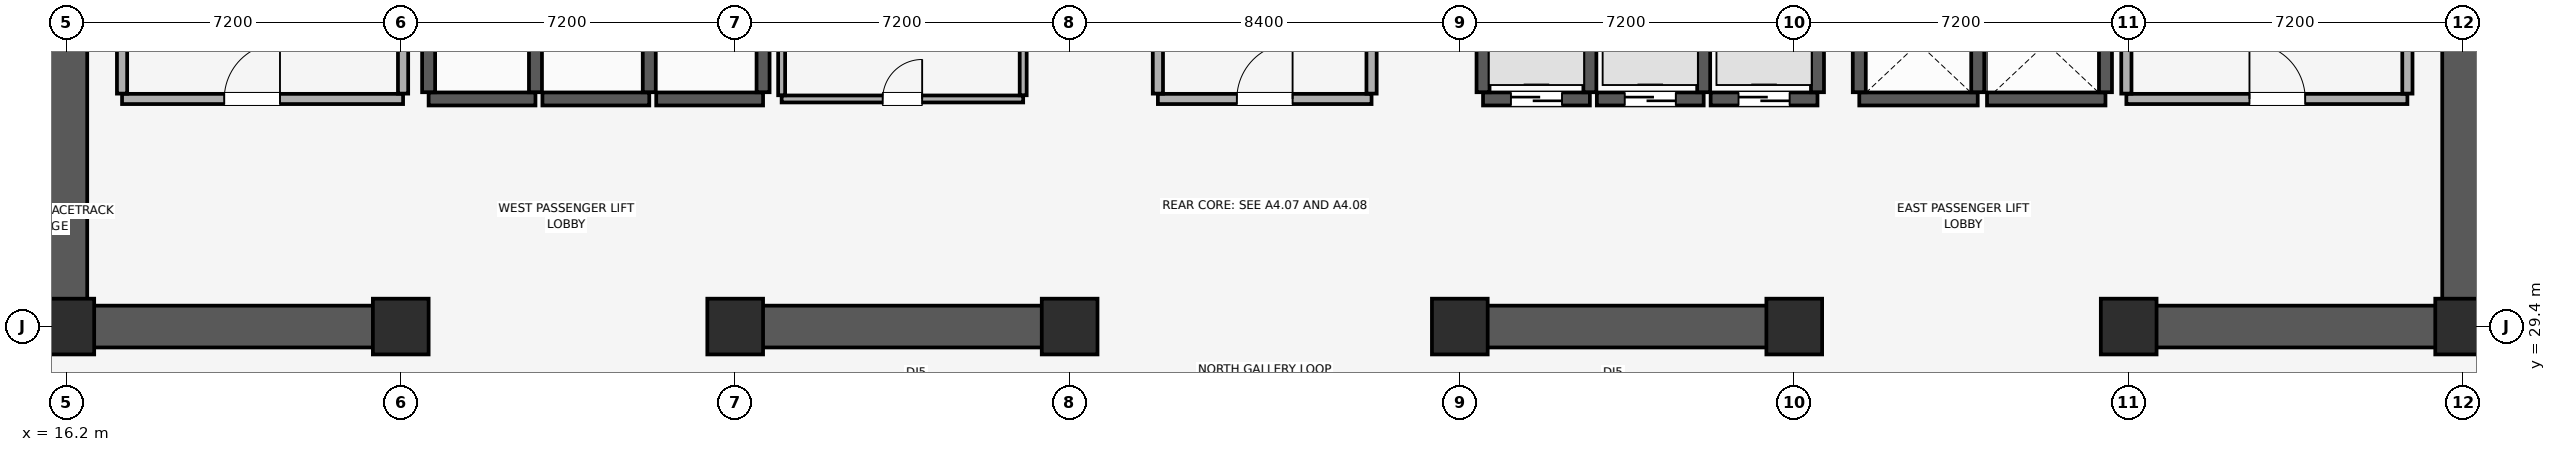
"""IFC4 building model, lengths in metres.
Left out: names, types, materials, properties, quantities, classifications, styles, units other than length and angle.
Written with IfcOpenShell. Run it as: python <this file> out.ifc"""

import sys

from ifc_helpers import new_model, si_unit, direction, frame, frame_2d, origin, origin_2d, place, context, subcontext, project, spatial, rectangle, extrude, element, fill, save


model = new_model("IFC4")
c1 = context("Model", 3, precision=1e-05, world=origin(), true_north=direction((0.0, 1.0)))
c2 = subcontext(c1, "Body", "Model", "MODEL_VIEW")
j1 = project(units=[si_unit("LENGTHUNIT", "METRE"), si_unit("PLANEANGLEUNIT", "RADIAN")], contexts=[c1])
p1 = place(None, origin())
s1 = spatial("IfcSite", under=j1, at=p1, CompositionType="ELEMENT")
p2 = place(p1, origin())
s2 = spatial("IfcBuilding", under=s1, at=p2, CompositionType="ELEMENT")
p3 = place(p2, frame((0.0, 0.0, 135.35)))
s3 = spatial("IfcBuildingStorey", under=s2, at=p3, CompositionType="ELEMENT", Elevation=135.35)
for number, where, z_axis, x_axis in (
    (1, (16.2, 29.4, 0.0), (0.0, 0.0, 1.0), (1.0, 0.0, 0.0)),
    (2, (23.4, 29.4, 0.0), (0.0, 0.0, 1.0), (1.0, 0.0, 0.0)),
    (3, (30.6, 29.4, 0.0), (0.0, 0.0, 1.0), (1.0, 0.0, 0.0)),
    (4, (37.8, 29.4, 0.0), (0.0, 0.0, 1.0), (1.0, 0.0, 0.0)),
    (5, (46.2, 29.4, 0.0), (0.0, 0.0, 1.0), (1.0, 0.0, 0.0)),
    (6, (53.4, 29.4, 0.0), (0.0, 0.0, 1.0), (1.0, 0.0, 0.0)),
    (7, (60.6, 29.4, 0.0), (0.0, 0.0, 1.0), (1.0, 0.0, 0.0)),
    (8, (67.8, 29.4, 0.0), (0.0, 0.0, 1.0), (1.0, 0.0, 0.0)),
):
    element("IfcColumn", number, at=place(p3, frame(where, z_axis=z_axis, x_axis=x_axis)), inside=s3, PredefinedType="COLUMN", context=c2, shape_type="SweptSolid", body=[
        extrude(rectangle(XDim=1.2, YDim=1.2, at=origin_2d()), origin(), (0.0, 0.0, 1.0), 3.56),
    ])
for number, where, z_axis, x_axis in (
    (9, (16.2, 29.4, 0.0), (0.0, 0.0, 1.0), (0.0, 1.0, 0.0)),
    (10, (67.8, 29.4, 0.0), (0.0, 0.0, 1.0), (0.0, 1.0, 0.0)),
):
    element("IfcWall", number, at=place(p3, frame(where, z_axis=z_axis, x_axis=x_axis)), inside=s3, PredefinedType="SHEAR", context=c2, shape_type="SweptSolid", body=[
        extrude(rectangle(XDim=19.2, YDim=0.9, at=frame_2d((9.6, 0.0))), origin(), (0.0, 0.0, 1.0), 3.56),
    ])
p4 = place(p3, frame((16.655, 29.4, 0.0), z_axis=(0.0, 0.0, 1.0), x_axis=(1.0, 0.0, 0.0)))
e11 = element("IfcWall", 11, at=p4, inside=s3, PredefinedType="SHEAR", context=c2, shape_type="SweptSolid", body=[
    extrude(rectangle(XDim=6.945, YDim=0.9, at=frame_2d((3.473, 0.0))), origin(), (0.0, 0.0, 1.0), 3.56),
])
for number, where, z_axis, x_axis in (
    (12, (30.4, 29.4, 0.0), (0.0, 0.0, 1.0), (1.0, 0.0, 0.0)),
    (13, (46.0, 29.4, 0.0), (0.0, 0.0, 1.0), (1.0, 0.0, 0.0)),
):
    element("IfcWall", number, at=place(p3, frame(where, z_axis=z_axis, x_axis=x_axis)), inside=s3, PredefinedType="SHEAR", context=c2, shape_type="SweptSolid", body=[
        extrude(rectangle(XDim=7.6, YDim=0.9, at=frame_2d((3.8, 0.0))), origin(), (0.0, 0.0, 1.0), 3.56),
    ])
p5 = place(p3, frame((60.4, 29.4, 0.0), z_axis=(0.0, 0.0, 1.0), x_axis=(1.0, 0.0, 0.0)))
e14 = element("IfcWall", 14, at=p5, inside=s3, PredefinedType="SHEAR", context=c2, shape_type="SweptSolid", body=[
    extrude(rectangle(XDim=6.945, YDim=0.9, at=frame_2d((3.473, 0.0))), origin(), (0.0, 0.0, 1.0), 3.56),
])
p6 = place(p3, frame((24.0, 34.3, 0.0), z_axis=(0.0, 0.0, 1.0), x_axis=(1.0, 0.0, 0.0)))
e15 = element("IfcWall", 15, at=p6, inside=s3, PredefinedType="SHEAR", context=c2, shape_type="SweptSolid", body=[
    extrude(rectangle(XDim=2.3, YDim=0.28, at=frame_2d((1.15, 0.0))), origin(), (0.0, 0.0, 1.0), 3.56),
])
for number, where, z_axis, x_axis in (
    (16, (24.0, 34.445, 0.0), (0.0, 0.0, 1.0), (0.0, 1.0, 0.0)),
    (17, (26.3, 34.445, 0.0), (0.0, 0.0, 1.0), (0.0, 1.0, 0.0)),
):
    element("IfcWall", number, at=place(p3, frame(where, z_axis=z_axis, x_axis=x_axis)), inside=s3, PredefinedType="SHEAR", context=c2, shape_type="SweptSolid", body=[
        extrude(rectangle(XDim=2.01, YDim=0.28, at=frame_2d((1.005, 0.0))), origin(), (0.0, 0.0, 1.0), 3.56),
    ])
p7 = place(p3, frame((26.45, 34.3, 0.0), z_axis=(0.0, 0.0, 1.0), x_axis=(1.0, 0.0, 0.0)))
e18 = element("IfcWall", 18, at=p7, inside=s3, PredefinedType="SHEAR", context=c2, shape_type="SweptSolid", body=[
    extrude(rectangle(XDim=2.3, YDim=0.28, at=frame_2d((1.15, 0.0))), origin(), (0.0, 0.0, 1.0), 3.56),
])
p8 = place(p3, frame((28.75, 34.445, 0.0), z_axis=(0.0, 0.0, 1.0), x_axis=(0.0, 1.0, 0.0)))
e19 = element("IfcWall", 19, at=p8, inside=s3, PredefinedType="SHEAR", context=c2, shape_type="SweptSolid", body=[
    extrude(rectangle(XDim=2.01, YDim=0.28, at=frame_2d((1.005, 0.0))), origin(), (0.0, 0.0, 1.0), 3.56),
])
p9 = place(p3, frame((28.9, 34.3, 0.0), z_axis=(0.0, 0.0, 1.0), x_axis=(1.0, 0.0, 0.0)))
e20 = element("IfcWall", 20, at=p9, inside=s3, PredefinedType="SHEAR", context=c2, shape_type="SweptSolid", body=[
    extrude(rectangle(XDim=2.3, YDim=0.28, at=frame_2d((1.15, 0.0))), origin(), (0.0, 0.0, 1.0), 3.56),
])
p10 = place(p3, frame((31.2, 34.445, 0.0), z_axis=(0.0, 0.0, 1.0), x_axis=(0.0, 1.0, 0.0)))
e21 = element("IfcWall", 21, at=p10, inside=s3, PredefinedType="SHEAR", context=c2, shape_type="SweptSolid", body=[
    extrude(rectangle(XDim=2.01, YDim=0.28, at=frame_2d((1.005, 0.0))), origin(), (0.0, 0.0, 1.0), 3.56),
])
p11 = place(p3, frame((46.7, 34.3, 0.0), z_axis=(0.0, 0.0, 1.0), x_axis=(1.0, 0.0, 0.0)))
e22 = element("IfcWall", 22, at=p11, inside=s3, PredefinedType="SHEAR", context=c2, shape_type="SweptSolid", body=[
    extrude(rectangle(XDim=2.3, YDim=0.28, at=frame_2d((1.15, 0.0))), origin(), (0.0, 0.0, 1.0), 3.56),
])
p12 = place(p11, frame((0.6, 0.0, 0.0)))
e23 = element("IfcOpeningElement", 23, at=p12, cuts=e22, PredefinedType="OPENING", context=c2, shape_type="SweptSolid", body=[
    extrude(rectangle(XDim=1.1, YDim=2.2, at=frame_2d((0.55, 1.1))), frame((0.0, 0.15, 0.0), z_axis=(0.0, -1.0, 0.0), x_axis=(1.0, 0.0, 0.0)), (0.0, 0.0, 1.0), 0.3),
])
for number, where, z_axis, x_axis in (
    (24, (46.7, 34.445, 0.0), (0.0, 0.0, 1.0), (0.0, 1.0, 0.0)),
    (25, (49.0, 34.445, 0.0), (0.0, 0.0, 1.0), (0.0, 1.0, 0.0)),
):
    element("IfcWall", number, at=place(p3, frame(where, z_axis=z_axis, x_axis=x_axis)), inside=s3, PredefinedType="SHEAR", context=c2, shape_type="SweptSolid", body=[
        extrude(rectangle(XDim=2.01, YDim=0.28, at=frame_2d((1.005, 0.0))), origin(), (0.0, 0.0, 1.0), 3.56),
    ])
p13 = place(p3, frame((49.15, 34.3, 0.0), z_axis=(0.0, 0.0, 1.0), x_axis=(1.0, 0.0, 0.0)))
e26 = element("IfcWall", 26, at=p13, inside=s3, PredefinedType="SHEAR", context=c2, shape_type="SweptSolid", body=[
    extrude(rectangle(XDim=2.3, YDim=0.28, at=frame_2d((1.15, 0.0))), origin(), (0.0, 0.0, 1.0), 3.56),
])
p14 = place(p13, frame((0.6, 0.0, 0.0)))
e27 = element("IfcOpeningElement", 27, at=p14, cuts=e26, PredefinedType="OPENING", context=c2, shape_type="SweptSolid", body=[
    extrude(rectangle(XDim=1.1, YDim=2.2, at=frame_2d((0.55, 1.1))), frame((0.0, 0.15, 0.0), z_axis=(0.0, -1.0, 0.0), x_axis=(1.0, 0.0, 0.0)), (0.0, 0.0, 1.0), 0.3),
])
p15 = place(p3, frame((51.45, 34.445, 0.0), z_axis=(0.0, 0.0, 1.0), x_axis=(0.0, 1.0, 0.0)))
e28 = element("IfcWall", 28, at=p15, inside=s3, PredefinedType="SHEAR", context=c2, shape_type="SweptSolid", body=[
    extrude(rectangle(XDim=2.01, YDim=0.28, at=frame_2d((1.005, 0.0))), origin(), (0.0, 0.0, 1.0), 3.56),
])
p16 = place(p3, frame((51.6, 34.3, 0.0), z_axis=(0.0, 0.0, 1.0), x_axis=(1.0, 0.0, 0.0)))
e29 = element("IfcWall", 29, at=p16, inside=s3, PredefinedType="SHEAR", context=c2, shape_type="SweptSolid", body=[
    extrude(rectangle(XDim=2.3, YDim=0.28, at=frame_2d((1.15, 0.0))), origin(), (0.0, 0.0, 1.0), 3.56),
])
p17 = place(p16, frame((0.6, 0.0, 0.0)))
e30 = element("IfcOpeningElement", 30, at=p17, cuts=e29, PredefinedType="OPENING", context=c2, shape_type="SweptSolid", body=[
    extrude(rectangle(XDim=1.1, YDim=2.2, at=frame_2d((0.55, 1.1))), frame((0.0, 0.15, 0.0), z_axis=(0.0, -1.0, 0.0), x_axis=(1.0, 0.0, 0.0)), (0.0, 0.0, 1.0), 0.3),
])
p18 = place(p3, frame((53.9, 34.445, 0.0), z_axis=(0.0, 0.0, 1.0), x_axis=(0.0, 1.0, 0.0)))
e31 = element("IfcWall", 31, at=p18, inside=s3, PredefinedType="SHEAR", context=c2, shape_type="SweptSolid", body=[
    extrude(rectangle(XDim=2.01, YDim=0.28, at=frame_2d((1.005, 0.0))), origin(), (0.0, 0.0, 1.0), 3.56),
])
p19 = place(p3, frame((54.8, 34.3, 0.0), z_axis=(0.0, 0.0, 1.0), x_axis=(1.0, 0.0, 0.0)))
e32 = element("IfcWall", 32, at=p19, inside=s3, PredefinedType="SHEAR", context=c2, shape_type="SweptSolid", body=[
    extrude(rectangle(XDim=2.55, YDim=0.28, at=frame_2d((1.275, 0.0))), origin(), (0.0, 0.0, 1.0), 3.56),
])
for number, where, z_axis, x_axis in (
    (33, (54.8, 34.445, 0.0), (0.0, 0.0, 1.0), (0.0, 1.0, 0.0)),
    (34, (57.35, 34.445, 0.0), (0.0, 0.0, 1.0), (0.0, 1.0, 0.0)),
):
    element("IfcWall", number, at=place(p3, frame(where, z_axis=z_axis, x_axis=x_axis)), inside=s3, PredefinedType="SHEAR", context=c2, shape_type="SweptSolid", body=[
        extrude(rectangle(XDim=2.11, YDim=0.28, at=frame_2d((1.055, 0.0))), origin(), (0.0, 0.0, 1.0), 3.56),
    ])
p20 = place(p3, frame((57.55, 34.3, 0.0), z_axis=(0.0, 0.0, 1.0), x_axis=(1.0, 0.0, 0.0)))
e35 = element("IfcWall", 35, at=p20, inside=s3, PredefinedType="SHEAR", context=c2, shape_type="SweptSolid", body=[
    extrude(rectangle(XDim=2.55, YDim=0.28, at=frame_2d((1.275, 0.0))), origin(), (0.0, 0.0, 1.0), 3.56),
])
p21 = place(p3, frame((60.1, 34.445, 0.0), z_axis=(0.0, 0.0, 1.0), x_axis=(0.0, 1.0, 0.0)))
e36 = element("IfcWall", 36, at=p21, inside=s3, PredefinedType="SHEAR", context=c2, shape_type="SweptSolid", body=[
    extrude(rectangle(XDim=2.11, YDim=0.28, at=frame_2d((1.055, 0.0))), origin(), (0.0, 0.0, 1.0), 3.56),
])
p22 = place(p3, frame((17.4, 34.3, 0.0), z_axis=(0.0, 0.0, 1.0), x_axis=(1.0, 0.0, 0.0)))
e37 = element("IfcWall", 37, at=p22, inside=s3, PredefinedType="PARTITIONING", context=c2, shape_type="SweptSolid", body=[
    extrude(rectangle(XDim=6.05, YDim=0.22, at=frame_2d((3.025, 0.0))), origin(), (0.0, 0.0, 1.0), 3.56),
])
p23 = place(p22, frame((2.2, 0.0, 0.0)))
e38 = element("IfcOpeningElement", 38, at=p23, cuts=e37, PredefinedType="OPENING", context=c2, shape_type="SweptSolid", body=[
    extrude(rectangle(XDim=1.2, YDim=2.15, at=frame_2d((0.6, 1.075))), frame((0.0, 0.12, 0.0), z_axis=(0.0, -1.0, 0.0), x_axis=(1.0, 0.0, 0.0)), (0.0, 0.0, 1.0), 0.24),
])
p24 = place(p3, frame((17.4, 34.415, 0.0), z_axis=(0.0, 0.0, 1.0), x_axis=(0.0, 1.0, 0.0)))
e39 = element("IfcWall", 39, at=p24, inside=s3, PredefinedType="PARTITIONING", context=c2, shape_type="SweptSolid", body=[
    extrude(rectangle(XDim=5.43, YDim=0.22, at=frame_2d((2.715, 0.0))), origin(), (0.0, 0.0, 1.0), 3.56),
])
p25 = place(p3, frame((23.45, 34.415, 0.0), z_axis=(0.0, 0.0, 1.0), x_axis=(0.0, 1.0, 0.0)))
e40 = element("IfcWall", 40, at=p25, inside=s3, PredefinedType="PARTITIONING", context=c2, shape_type="SweptSolid", body=[
    extrude(rectangle(XDim=5.64, YDim=0.22, at=frame_2d((2.82, 0.0))), origin(), (0.0, 0.0, 1.0), 3.56),
])
p26 = place(p3, frame((60.55, 34.3, 0.0), z_axis=(0.0, 0.0, 1.0), x_axis=(1.0, 0.0, 0.0)))
e41 = element("IfcWall", 41, at=p26, inside=s3, PredefinedType="PARTITIONING", context=c2, shape_type="SweptSolid", body=[
    extrude(rectangle(XDim=6.05, YDim=0.22, at=frame_2d((3.025, 0.0))), origin(), (0.0, 0.0, 1.0), 3.56),
])
p27 = place(p26, frame((2.65, 0.0, 0.0)))
e42 = element("IfcOpeningElement", 42, at=p27, cuts=e41, PredefinedType="OPENING", context=c2, shape_type="SweptSolid", body=[
    extrude(rectangle(XDim=1.2, YDim=2.15, at=frame_2d((0.6, 1.075))), frame((0.0, 0.12, 0.0), z_axis=(0.0, -1.0, 0.0), x_axis=(1.0, 0.0, 0.0)), (0.0, 0.0, 1.0), 0.24),
])
p28 = place(p3, frame((60.55, 34.415, 0.0), z_axis=(0.0, 0.0, 1.0), x_axis=(0.0, 1.0, 0.0)))
e43 = element("IfcWall", 43, at=p28, inside=s3, PredefinedType="PARTITIONING", context=c2, shape_type="SweptSolid", body=[
    extrude(rectangle(XDim=5.64, YDim=0.22, at=frame_2d((2.82, 0.0))), origin(), (0.0, 0.0, 1.0), 3.56),
])
p29 = place(p3, frame((66.6, 34.415, 0.0), z_axis=(0.0, 0.0, 1.0), x_axis=(0.0, 1.0, 0.0)))
e44 = element("IfcWall", 44, at=p29, inside=s3, PredefinedType="PARTITIONING", context=c2, shape_type="SweptSolid", body=[
    extrude(rectangle(XDim=5.43, YDim=0.22, at=frame_2d((2.715, 0.0))), origin(), (0.0, 0.0, 1.0), 3.56),
])
p30 = place(p3, frame((39.7, 34.3, 0.0), z_axis=(0.0, 0.0, 1.0), x_axis=(1.0, 0.0, 0.0)))
e45 = element("IfcWall", 45, at=p30, inside=s3, PredefinedType="PARTITIONING", context=c2, shape_type="SweptSolid", body=[
    extrude(rectangle(XDim=4.6, YDim=0.22, at=frame_2d((2.3, 0.0))), origin(), (0.0, 0.0, 1.0), 3.56),
])
p31 = place(p30, frame((1.7, 0.0, 0.0)))
e46 = element("IfcOpeningElement", 46, at=p31, cuts=e45, PredefinedType="OPENING", context=c2, shape_type="SweptSolid", body=[
    extrude(rectangle(XDim=1.2, YDim=2.15, at=frame_2d((0.6, 1.075))), frame((0.0, 0.12, 0.0), z_axis=(0.0, -1.0, 0.0), x_axis=(1.0, 0.0, 0.0)), (0.0, 0.0, 1.0), 0.24),
])
for number, where, z_axis, x_axis in (
    (47, (39.7, 34.415, 0.0), (0.0, 0.0, 1.0), (0.0, 1.0, 0.0)),
    (48, (44.3, 34.415, 0.0), (0.0, 0.0, 1.0), (0.0, 1.0, 0.0)),
):
    element("IfcWall", number, at=place(p3, frame(where, z_axis=z_axis, x_axis=x_axis)), inside=s3, PredefinedType="PARTITIONING", context=c2, shape_type="SweptSolid", body=[
        extrude(rectangle(XDim=5.785, YDim=0.22, at=frame_2d((2.893, 0.0))), origin(), (0.0, 0.0, 1.0), 3.56),
    ])
p32 = place(p3, frame((31.6, 34.3, 0.0), z_axis=(0.0, 0.0, 1.0), x_axis=(1.0, 0.0, 0.0)))
e49 = element("IfcWall", 49, at=p32, inside=s3, PredefinedType="PARTITIONING", context=c2, shape_type="SweptSolid", body=[
    extrude(rectangle(XDim=5.2, YDim=0.15, at=frame_2d((2.6, 0.0))), origin(), (0.0, 0.0, 1.0), 3.56),
])
p33 = place(p32, frame((2.175, 0.0, 0.0)))
e50 = element("IfcOpeningElement", 50, at=p33, cuts=e49, PredefinedType="OPENING", context=c2, shape_type="SweptSolid", body=[
    extrude(rectangle(XDim=0.85, YDim=2.1, at=frame_2d((0.425, 1.05))), frame((0.0, 0.085, 0.0), z_axis=(0.0, -1.0, 0.0), x_axis=(1.0, 0.0, 0.0)), (0.0, 0.0, 1.0), 0.17),
])
for number, where, z_axis, x_axis in (
    (51, (31.6, 34.38, 0.0), (0.0, 0.0, 1.0), (0.0, 1.0, 0.0)),
    (52, (36.8, 34.38, 0.0), (0.0, 0.0, 1.0), (0.0, 1.0, 0.0)),
):
    element("IfcWall", number, at=place(p3, frame(where, z_axis=z_axis, x_axis=x_axis)), inside=s3, PredefinedType="PARTITIONING", context=c2, shape_type="SweptSolid", body=[
        extrude(rectangle(XDim=4.94, YDim=0.15, at=frame_2d((2.47, 0.0))), origin(), (0.0, 0.0, 1.0), 3.56),
    ])
p34 = place(p12, origin())
e53 = element("IfcDoor", 53, at=p34, inside=s3, OperationType="DOUBLE_DOOR_SLIDING", PredefinedType="DOOR", context=c2, shape_type="SweptSolid", body=[
    extrude(rectangle(XDim=1.1, YDim=2.2, at=frame_2d((0.55, 1.1))), frame((0.0, 0.025, 0.0), z_axis=(0.0, -1.0, 0.0), x_axis=(1.0, 0.0, 0.0)), (0.0, 0.0, 1.0), 0.05),
])
fill(e23, e53)
p35 = place(p14, origin())
e54 = element("IfcDoor", 54, at=p35, inside=s3, OperationType="DOUBLE_DOOR_SLIDING", PredefinedType="DOOR", context=c2, shape_type="SweptSolid", body=[
    extrude(rectangle(XDim=1.1, YDim=2.2, at=frame_2d((0.55, 1.1))), frame((0.0, 0.025, 0.0), z_axis=(0.0, -1.0, 0.0), x_axis=(1.0, 0.0, 0.0)), (0.0, 0.0, 1.0), 0.05),
])
fill(e27, e54)
p36 = place(p17, origin())
e55 = element("IfcDoor", 55, at=p36, inside=s3, OperationType="DOUBLE_DOOR_SLIDING", PredefinedType="DOOR", context=c2, shape_type="SweptSolid", body=[
    extrude(rectangle(XDim=1.1, YDim=2.2, at=frame_2d((0.55, 1.1))), frame((0.0, 0.025, 0.0), z_axis=(0.0, -1.0, 0.0), x_axis=(1.0, 0.0, 0.0)), (0.0, 0.0, 1.0), 0.05),
])
fill(e30, e55)
p37 = place(p23, origin())
e56 = element("IfcDoor", 56, at=p37, inside=s3, OperationType="SINGLE_SWING_RIGHT", PredefinedType="DOOR", context=c2, shape_type="SweptSolid", body=[
    extrude(rectangle(XDim=1.2, YDim=2.15, at=frame_2d((0.6, 1.075))), frame((0.0, 0.025, 0.0), z_axis=(0.0, -1.0, 0.0), x_axis=(1.0, 0.0, 0.0)), (0.0, 0.0, 1.0), 0.05),
])
fill(e38, e56)
p38 = place(p27, origin())
e57 = element("IfcDoor", 57, at=p38, inside=s3, OperationType="SINGLE_SWING_LEFT", PredefinedType="DOOR", context=c2, shape_type="SweptSolid", body=[
    extrude(rectangle(XDim=1.2, YDim=2.15, at=frame_2d((0.6, 1.075))), frame((0.0, 0.025, 0.0), z_axis=(0.0, -1.0, 0.0), x_axis=(1.0, 0.0, 0.0)), (0.0, 0.0, 1.0), 0.05),
])
fill(e42, e57)
p39 = place(p31, origin())
e58 = element("IfcDoor", 58, at=p39, inside=s3, OperationType="SINGLE_SWING_RIGHT", PredefinedType="DOOR", context=c2, shape_type="SweptSolid", body=[
    extrude(rectangle(XDim=1.2, YDim=2.15, at=frame_2d((0.6, 1.075))), frame((0.0, 0.025, 0.0), z_axis=(0.0, -1.0, 0.0), x_axis=(1.0, 0.0, 0.0)), (0.0, 0.0, 1.0), 0.05),
])
fill(e46, e58)
p40 = place(p33, origin())
e59 = element("IfcDoor", 59, at=p40, inside=s3, OperationType="SINGLE_SWING_RIGHT", PredefinedType="DOOR", context=c2, shape_type="SweptSolid", body=[
    extrude(rectangle(XDim=0.85, YDim=2.1, at=frame_2d((0.425, 1.05))), frame((0.0, 0.025, 0.0), z_axis=(0.0, -1.0, 0.0), x_axis=(1.0, 0.0, 0.0)), (0.0, 0.0, 1.0), 0.05),
])
fill(e50, e59)
save(model, sys.argv[1])
